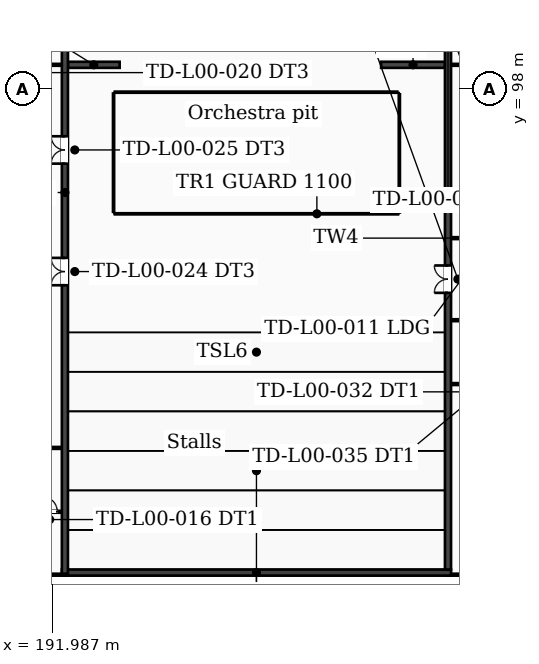
"""IFC4 building model, lengths in metres.
Left out: names, types, materials, properties, quantities, classifications, styles, units other than length and angle.
Written with IfcOpenShell. Run it as: python <this file> out.ifc"""

import sys

from ifc_helpers import new_model, si_unit, direction, frame, frame_2d, origin, place, context, subcontext, project, spatial, rectangle, extrude, element, fill, save


model = new_model("IFC4")
c1 = context("Model", 3, precision=1e-05, world=origin(), true_north=direction((0.0, 1.0)))
c2 = subcontext(c1, "Body", "Model", "MODEL_VIEW")
j1 = project(units=[si_unit("LENGTHUNIT", "METRE"), si_unit("PLANEANGLEUNIT", "RADIAN")], contexts=[c1])
p1 = place(None, origin())
s1 = spatial("IfcSite", under=j1, at=p1, CompositionType="ELEMENT")
p2 = place(p1, origin())
s2 = spatial("IfcBuilding", under=s1, at=p2, CompositionType="ELEMENT")
p3 = place(p2, origin())
s3 = spatial("IfcBuildingStorey", under=s2, at=p3, CompositionType="ELEMENT", Elevation=0.0)
p4 = place(p3, frame((184.7, 66.062, 0.0), z_axis=(0.0, 0.0, 1.0), x_axis=(1.0, 0.0, 0.0)))
e1 = element("IfcWall", 1, at=p4, inside=s3, PredefinedType="PARTITIONING", context=c2, shape_type="SweptSolid", body=[
    extrude(rectangle(XDim=8.3, YDim=0.125, at=frame_2d((4.15, 0.0))), origin(), (0.0, 0.0, 1.0), 8.7),
])
p5 = place(p3, frame((217.8, 66.062, 0.0), z_axis=(0.0, 0.0, 1.0), x_axis=(1.0, 0.0, 0.0)))
e2 = element("IfcWall", 2, at=p5, inside=s3, PredefinedType="PARTITIONING", context=c2, shape_type="SweptSolid", body=[
    extrude(rectangle(XDim=8.3, YDim=0.125, at=frame_2d((4.15, 0.0))), origin(), (0.0, 0.0, 1.0), 8.7),
])
p6 = place(p5, frame((3.2, 0.0, 0.0)))
e3 = element("IfcOpeningElement", 3, at=p6, cuts=e2, PredefinedType="OPENING", context=c2, shape_type="SweptSolid", body=[
    extrude(rectangle(XDim=2.4, YDim=2.4, at=frame_2d((1.2, 1.2))), frame((0.0, 0.073, 0.0), z_axis=(0.0, -1.0, 0.0), x_axis=(1.0, 0.0, 0.0)), (0.0, 0.0, 1.0), 0.145),
])
p7 = place(p3, frame((192.6, 66.2, 0.0), z_axis=(0.0, 0.0, 1.0), x_axis=(1.0, 0.0, 0.0)))
e4 = element("IfcWall", 4, at=p7, inside=s3, PredefinedType="SOLIDWALL", context=c2, shape_type="SweptSolid", body=[
    extrude(rectangle(XDim=25.6, YDim=0.4, at=frame_2d((12.8, 0.0))), origin(), (0.0, 0.0, 1.0), 8.7),
])
p8 = place(p3, frame((184.462, 70.2, 0.0), z_axis=(0.0, 0.0, 1.0), x_axis=(1.0, 0.0, 0.0)))
e5 = element("IfcWall", 5, at=p8, inside=s3, PredefinedType="PARTITIONING", context=c2, shape_type="SweptSolid", body=[
    extrude(rectangle(XDim=8.138, YDim=0.125, at=frame_2d((4.069, 0.0))), origin(), (0.0, 0.0, 1.0), 8.7),
])
p9 = place(p8, frame((1.038, 0.0, 0.0)))
e6 = element("IfcOpeningElement", 6, at=p9, cuts=e5, PredefinedType="OPENING", context=c2, shape_type="SweptSolid", body=[
    extrude(rectangle(XDim=1.0, YDim=2.1, at=frame_2d((0.5, 1.05))), frame((0.0, 0.073, 0.0), z_axis=(0.0, -1.0, 0.0), x_axis=(1.0, 0.0, 0.0)), (0.0, 0.0, 1.0), 0.145),
])
p10 = place(p8, frame((4.238, 0.0, 0.0)))
e7 = element("IfcOpeningElement", 7, at=p10, cuts=e5, PredefinedType="OPENING", context=c2, shape_type="SweptSolid", body=[
    extrude(rectangle(XDim=1.0, YDim=2.1, at=frame_2d((0.5, 1.05))), frame((0.0, 0.073, 0.0), z_axis=(0.0, -1.0, 0.0), x_axis=(1.0, 0.0, 0.0)), (0.0, 0.0, 1.0), 0.145),
])
p11 = place(p8, frame((6.837, 0.0, 0.0)))
e8 = element("IfcOpeningElement", 8, at=p11, cuts=e5, PredefinedType="OPENING", context=c2, shape_type="SweptSolid", body=[
    extrude(rectangle(XDim=1.0, YDim=2.1, at=frame_2d((0.5, 1.05))), frame((0.0, 0.073, 0.0), z_axis=(0.0, -1.0, 0.0), x_axis=(1.0, 0.0, 0.0)), (0.0, 0.0, 1.0), 0.145),
])
p12 = place(p3, frame((184.7, 74.4, 0.0), z_axis=(0.0, 0.0, 1.0), x_axis=(1.0, 0.0, 0.0)))
e9 = element("IfcWall", 9, at=p12, inside=s3, PredefinedType="PARTITIONING", context=c2, shape_type="SweptSolid", body=[
    extrude(rectangle(XDim=7.9, YDim=0.125, at=frame_2d((3.95, 0.0))), origin(), (0.0, 0.0, 1.0), 8.7),
])
p13 = place(p12, frame((3.0, 0.0, 0.0)))
e10 = element("IfcOpeningElement", 10, at=p13, cuts=e9, PredefinedType="OPENING", context=c2, shape_type="SweptSolid", body=[
    extrude(rectangle(XDim=1.8, YDim=2.1, at=frame_2d((0.9, 1.05))), frame((0.0, 0.073, 0.0), z_axis=(0.0, -1.0, 0.0), x_axis=(1.0, 0.0, 0.0)), (0.0, 0.0, 1.0), 0.145),
])
p14 = place(p3, frame((218.2, 78.6, 0.0), z_axis=(0.0, 0.0, 1.0), x_axis=(1.0, 0.0, 0.0)))
e11 = element("IfcWall", 11, at=p14, inside=s3, PredefinedType="PARTITIONING", context=c2, shape_type="SweptSolid", body=[
    extrude(rectangle(XDim=5.863, YDim=0.125, at=frame_2d((2.931, 0.0))), origin(), (0.0, 0.0, 1.0), 8.7),
])
p15 = place(p14, frame((0.6, 0.0, 0.0)))
e12 = element("IfcOpeningElement", 12, at=p15, cuts=e11, PredefinedType="OPENING", context=c2, shape_type="SweptSolid", body=[
    extrude(rectangle(XDim=1.0, YDim=2.1, at=frame_2d((0.5, 1.05))), frame((0.0, 0.073, 0.0), z_axis=(0.0, -1.0, 0.0), x_axis=(1.0, 0.0, 0.0)), (0.0, 0.0, 1.0), 0.145),
])
p16 = place(p14, frame((4.0, 0.0, 0.0)))
e13 = element("IfcOpeningElement", 13, at=p16, cuts=e11, PredefinedType="OPENING", context=c2, shape_type="SweptSolid", body=[
    extrude(rectangle(XDim=1.0, YDim=2.1, at=frame_2d((0.5, 1.05))), frame((0.0, 0.073, 0.0), z_axis=(0.0, -1.0, 0.0), x_axis=(1.0, 0.0, 0.0)), (0.0, 0.0, 1.0), 0.145),
])
p17 = place(p3, frame((218.2, 82.8, 0.0), z_axis=(0.0, 0.0, 1.0), x_axis=(1.0, 0.0, 0.0)))
e14 = element("IfcWall", 14, at=p17, inside=s3, PredefinedType="PARTITIONING", context=c2, shape_type="SweptSolid", body=[
    extrude(rectangle(XDim=7.9, YDim=0.125, at=frame_2d((3.95, 0.0))), origin(), (0.0, 0.0, 1.0), 8.7),
])
p18 = place(p17, frame((6.5, 0.0, 0.0)))
e15 = element("IfcOpeningElement", 15, at=p18, cuts=e14, PredefinedType="OPENING", context=c2, shape_type="SweptSolid", body=[
    extrude(rectangle(XDim=1.0, YDim=2.1, at=frame_2d((0.5, 1.05))), frame((0.0, 0.073, 0.0), z_axis=(0.0, -1.0, 0.0), x_axis=(1.0, 0.0, 0.0)), (0.0, 0.0, 1.0), 0.145),
])
p19 = place(p3, frame((218.2, 88.2, 0.0), z_axis=(0.0, 0.0, 1.0), x_axis=(1.0, 0.0, 0.0)))
e16 = element("IfcWall", 16, at=p19, inside=s3, PredefinedType="PARTITIONING", context=c2, shape_type="SweptSolid", body=[
    extrude(rectangle(XDim=24.875, YDim=0.125, at=frame_2d((12.438, 0.0))), origin(), (0.0, 0.0, 1.0), 8.7),
])
p20 = place(p19, frame((3.5, 0.0, 0.0)))
e17 = element("IfcOpeningElement", 17, at=p20, cuts=e16, PredefinedType="OPENING", context=c2, shape_type="SweptSolid", body=[
    extrude(rectangle(XDim=1.0, YDim=2.1, at=frame_2d((0.5, 1.05))), frame((0.0, 0.073, 0.0), z_axis=(0.0, -1.0, 0.0), x_axis=(1.0, 0.0, 0.0)), (0.0, 0.0, 1.0), 0.145),
])
p21 = place(p19, frame((9.8, 0.0, 0.0)))
e18 = element("IfcOpeningElement", 18, at=p21, cuts=e16, PredefinedType="OPENING", context=c2, shape_type="SweptSolid", body=[
    extrude(rectangle(XDim=1.0, YDim=2.1, at=frame_2d((0.5, 1.05))), frame((0.0, 0.073, 0.0), z_axis=(0.0, -1.0, 0.0), x_axis=(1.0, 0.0, 0.0)), (0.0, 0.0, 1.0), 0.145),
])
p22 = place(p19, frame((14.0, 0.0, 0.0)))
e19 = element("IfcOpeningElement", 19, at=p22, cuts=e16, PredefinedType="OPENING", context=c2, shape_type="SweptSolid", body=[
    extrude(rectangle(XDim=1.0, YDim=2.1, at=frame_2d((0.5, 1.05))), frame((0.0, 0.073, 0.0), z_axis=(0.0, -1.0, 0.0), x_axis=(1.0, 0.0, 0.0)), (0.0, 0.0, 1.0), 0.145),
])
p23 = place(p19, frame((18.2, 0.0, 0.0)))
e20 = element("IfcOpeningElement", 20, at=p23, cuts=e16, PredefinedType="OPENING", context=c2, shape_type="SweptSolid", body=[
    extrude(rectangle(XDim=1.0, YDim=2.1, at=frame_2d((0.5, 1.05))), frame((0.0, 0.073, 0.0), z_axis=(0.0, -1.0, 0.0), x_axis=(1.0, 0.0, 0.0)), (0.0, 0.0, 1.0), 0.145),
])
p24 = place(p19, frame((22.4, 0.0, 0.0)))
e21 = element("IfcOpeningElement", 21, at=p24, cuts=e16, PredefinedType="OPENING", context=c2, shape_type="SweptSolid", body=[
    extrude(rectangle(XDim=1.0, YDim=2.1, at=frame_2d((0.5, 1.05))), frame((0.0, 0.073, 0.0), z_axis=(0.0, -1.0, 0.0), x_axis=(1.0, 0.0, 0.0)), (0.0, 0.0, 1.0), 0.145),
])
p25 = place(p3, frame((218.2, 91.2, 0.0), z_axis=(0.0, 0.0, 1.0), x_axis=(1.0, 0.0, 0.0)))
e22 = element("IfcWall", 22, at=p25, inside=s3, PredefinedType="PARTITIONING", context=c2, shape_type="SweptSolid", body=[
    extrude(rectangle(XDim=7.9, YDim=0.125, at=frame_2d((3.95, 0.0))), origin(), (0.0, 0.0, 1.0), 8.7),
])
p26 = place(p25, frame((3.5, 0.0, 0.0)))
e23 = element("IfcOpeningElement", 23, at=p26, cuts=e22, PredefinedType="OPENING", context=c2, shape_type="SweptSolid", body=[
    extrude(rectangle(XDim=1.0, YDim=2.1, at=frame_2d((0.5, 1.05))), frame((0.0, 0.073, 0.0), z_axis=(0.0, -1.0, 0.0), x_axis=(1.0, 0.0, 0.0)), (0.0, 0.0, 1.0), 0.145),
])
p27 = place(p3, frame((184.7, 99.6, 0.0), z_axis=(0.0, 0.0, 1.0), x_axis=(1.0, 0.0, 0.0)))
e24 = element("IfcWall", 24, at=p27, inside=s3, PredefinedType="PARTITIONING", context=c2, shape_type="SweptSolid", body=[
    extrude(rectangle(XDim=7.9, YDim=0.125, at=frame_2d((3.95, 0.0))), origin(), (0.0, 0.0, 1.0), 8.7),
])
p28 = place(p27, frame((1.9, 0.0, 0.0)))
e25 = element("IfcOpeningElement", 25, at=p28, cuts=e24, PredefinedType="OPENING", context=c2, shape_type="SweptSolid", body=[
    extrude(rectangle(XDim=1.8, YDim=2.1, at=frame_2d((0.9, 1.05))), frame((0.0, 0.073, 0.0), z_axis=(0.0, -1.0, 0.0), x_axis=(1.0, 0.0, 0.0)), (0.0, 0.0, 1.0), 0.145),
])
p29 = place(p3, frame((193.0, 99.6, 0.0), z_axis=(0.0, 0.0, 1.0), x_axis=(1.0, 0.0, 0.0)))
e26 = element("IfcWall", 26, at=p29, inside=s3, PredefinedType="SOLIDWALL", context=c2, shape_type="SweptSolid", body=[
    extrude(rectangle(XDim=3.4, YDim=0.4, at=frame_2d((1.7, 0.0))), origin(), (0.0, 0.0, 1.0), 8.7),
])
p30 = place(p3, frame((213.6, 99.6, 0.0), z_axis=(0.0, 0.0, 1.0), x_axis=(1.0, 0.0, 0.0)))
e27 = element("IfcWall", 27, at=p30, inside=s3, PredefinedType="SOLIDWALL", context=c2, shape_type="SweptSolid", body=[
    extrude(rectangle(XDim=4.2, YDim=0.4, at=frame_2d((2.1, 0.0))), origin(), (0.0, 0.0, 1.0), 8.7),
])
p31 = place(p3, frame((218.2, 99.6, 0.0), z_axis=(0.0, 0.0, 1.0), x_axis=(1.0, 0.0, 0.0)))
e28 = element("IfcWall", 28, at=p31, inside=s3, PredefinedType="PARTITIONING", context=c2, shape_type="SweptSolid", body=[
    extrude(rectangle(XDim=7.9, YDim=0.125, at=frame_2d((3.95, 0.0))), origin(), (0.0, 0.0, 1.0), 8.7),
])
p32 = place(p31, frame((3.1, 0.0, 0.0)))
e29 = element("IfcOpeningElement", 29, at=p32, cuts=e28, PredefinedType="OPENING", context=c2, shape_type="SweptSolid", body=[
    extrude(rectangle(XDim=1.8, YDim=2.1, at=frame_2d((0.9, 1.05))), frame((0.0, 0.073, 0.0), z_axis=(0.0, -1.0, 0.0), x_axis=(1.0, 0.0, 0.0)), (0.0, 0.0, 1.0), 0.145),
])
p33 = place(p3, frame((192.8, 66.125, 0.0), z_axis=(0.0, 0.0, 1.0), x_axis=(0.0, 1.0, 0.0)))
e30 = element("IfcWall", 30, at=p33, inside=s3, PredefinedType="SOLIDWALL", context=c2, shape_type="SweptSolid", body=[
    extrude(rectangle(XDim=50.15, YDim=0.4, at=frame_2d((25.075, 0.0))), origin(), (0.0, 0.0, 1.0), 8.7),
])
p34 = place(p33, frame((18.975, 0.0, 0.0)))
e31 = element("IfcOpeningElement", 31, at=p34, cuts=e30, PredefinedType="OPENING", context=c2, shape_type="SweptSolid", body=[
    extrude(rectangle(XDim=1.8, YDim=2.1, at=frame_2d((0.9, 1.05))), frame((0.0, 0.21, 0.0), z_axis=(0.0, -1.0, 0.0), x_axis=(1.0, 0.0, 0.0)), (0.0, 0.0, 1.0), 0.42),
])
p35 = place(p33, frame((26.975, 0.0, 0.0)))
e32 = element("IfcOpeningElement", 32, at=p35, cuts=e30, PredefinedType="OPENING", context=c2, shape_type="SweptSolid", body=[
    extrude(rectangle(XDim=1.8, YDim=2.1, at=frame_2d((0.9, 1.05))), frame((0.0, 0.21, 0.0), z_axis=(0.0, -1.0, 0.0), x_axis=(1.0, 0.0, 0.0)), (0.0, 0.0, 1.0), 0.42),
])
p36 = place(p33, frame((35.975, 0.0, 0.0)))
e33 = element("IfcOpeningElement", 33, at=p36, cuts=e30, PredefinedType="OPENING", context=c2, shape_type="SweptSolid", body=[
    extrude(rectangle(XDim=1.8, YDim=2.1, at=frame_2d((0.9, 1.05))), frame((0.0, 0.21, 0.0), z_axis=(0.0, -1.0, 0.0), x_axis=(1.0, 0.0, 0.0)), (0.0, 0.0, 1.0), 0.42),
])
p37 = place(p3, frame((218.0, 66.4, 0.0), z_axis=(0.0, 0.0, 1.0), x_axis=(0.0, 1.0, 0.0)))
e34 = element("IfcWall", 34, at=p37, inside=s3, PredefinedType="SOLIDWALL", context=c2, shape_type="SweptSolid", body=[
    extrude(rectangle(XDim=49.6, YDim=0.4, at=frame_2d((24.8, 0.0))), origin(), (0.0, 0.0, 1.0), 8.7),
])
p38 = place(p37, frame((18.2, 0.0, 0.0)))
e35 = element("IfcOpeningElement", 35, at=p38, cuts=e34, PredefinedType="OPENING", context=c2, shape_type="SweptSolid", body=[
    extrude(rectangle(XDim=1.8, YDim=2.1, at=frame_2d((0.9, 1.05))), frame((0.0, 0.21, 0.0), z_axis=(0.0, -1.0, 0.0), x_axis=(1.0, 0.0, 0.0)), (0.0, 0.0, 1.0), 0.42),
])
p39 = place(p37, frame((35.7, 0.0, 0.0)))
e36 = element("IfcOpeningElement", 36, at=p39, cuts=e34, PredefinedType="OPENING", context=c2, shape_type="SweptSolid", body=[
    extrude(rectangle(XDim=1.8, YDim=2.1, at=frame_2d((0.9, 1.05))), frame((0.0, 0.21, 0.0), z_axis=(0.0, -1.0, 0.0), x_axis=(1.0, 0.0, 0.0)), (0.0, 0.0, 1.0), 0.42),
])
p40 = place(p37, frame((44.7, 0.0, 0.0)))
e37 = element("IfcOpeningElement", 37, at=p40, cuts=e34, PredefinedType="OPENING", context=c2, shape_type="SweptSolid", body=[
    extrude(rectangle(XDim=1.8, YDim=2.1, at=frame_2d((0.9, 1.05))), frame((0.0, 0.21, 0.0), z_axis=(0.0, -1.0, 0.0), x_axis=(1.0, 0.0, 0.0)), (0.0, 0.0, 1.0), 0.42),
])
for number, where, z_axis, x_axis in (
    (38, (195.7, 89.65, -2.5), (0.0, 0.0, 1.0), (1.0, 0.0, 0.0)),
    (39, (195.7, 97.95, -2.5), (0.0, 0.0, 1.0), (1.0, 0.0, 0.0)),
):
    element("IfcWall", number, at=place(p3, frame(where, z_axis=z_axis, x_axis=x_axis)), inside=s3, PredefinedType="SOLIDWALL", context=c2, shape_type="SweptSolid", body=[
        extrude(rectangle(XDim=19.4, YDim=0.3, at=frame_2d((9.7, 0.0))), origin(), (0.0, 0.0, 1.0), 2.2),
    ])
for number, where, z_axis, x_axis in (
    (40, (195.85, 89.8, -2.5), (0.0, 0.0, 1.0), (0.0, 1.0, 0.0)),
    (41, (214.95, 89.8, -2.5), (0.0, 0.0, 1.0), (0.0, 1.0, 0.0)),
):
    element("IfcWall", number, at=place(p3, frame(where, z_axis=z_axis, x_axis=x_axis)), inside=s3, PredefinedType="SOLIDWALL", context=c2, shape_type="SweptSolid", body=[
        extrude(rectangle(XDim=8.0, YDim=0.3, at=frame_2d((4.0, 0.0))), origin(), (0.0, 0.0, 1.0), 2.2),
    ])
p41 = place(p11, origin())
e42 = element("IfcDoor", 42, at=p41, inside=s3, OperationType="SINGLE_SWING_LEFT", PredefinedType="DOOR", context=c2, shape_type="SweptSolid", body=[
    extrude(rectangle(XDim=1.0, YDim=2.1, at=frame_2d((0.5, 1.05))), frame((0.0, 0.025, 0.0), z_axis=(0.0, -1.0, 0.0), x_axis=(1.0, 0.0, 0.0)), (0.0, 0.0, 1.0), 0.05),
])
fill(e8, e42)
p42 = place(p34, origin())
e43 = element("IfcDoor", 43, at=p42, inside=s3, OperationType="DOUBLE_DOOR_SINGLE_SWING", PredefinedType="DOOR", context=c2, shape_type="SweptSolid", body=[
    extrude(rectangle(XDim=1.8, YDim=2.1, at=frame_2d((0.9, 1.05))), frame((0.0, 0.025, 0.0), z_axis=(0.0, -1.0, 0.0), x_axis=(1.0, 0.0, 0.0)), (0.0, 0.0, 1.0), 0.05),
])
fill(e31, e43)
p43 = place(p35, origin())
e44 = element("IfcDoor", 44, at=p43, inside=s3, OperationType="DOUBLE_DOOR_SINGLE_SWING", PredefinedType="DOOR", context=c2, shape_type="SweptSolid", body=[
    extrude(rectangle(XDim=1.8, YDim=2.1, at=frame_2d((0.9, 1.05))), frame((0.0, 0.025, 0.0), z_axis=(0.0, -1.0, 0.0), x_axis=(1.0, 0.0, 0.0)), (0.0, 0.0, 1.0), 0.05),
])
fill(e32, e44)
p44 = place(p38, origin())
e45 = element("IfcDoor", 45, at=p44, inside=s3, OperationType="DOUBLE_DOOR_SINGLE_SWING", PredefinedType="DOOR", context=c2, shape_type="SweptSolid", body=[
    extrude(rectangle(XDim=1.8, YDim=2.1, at=frame_2d((0.9, 1.05))), frame((0.0, 0.025, 0.0), z_axis=(0.0, -1.0, 0.0), x_axis=(1.0, 0.0, 0.0)), (0.0, 0.0, 1.0), 0.05),
])
fill(e35, e45)
save(model, sys.argv[1])
